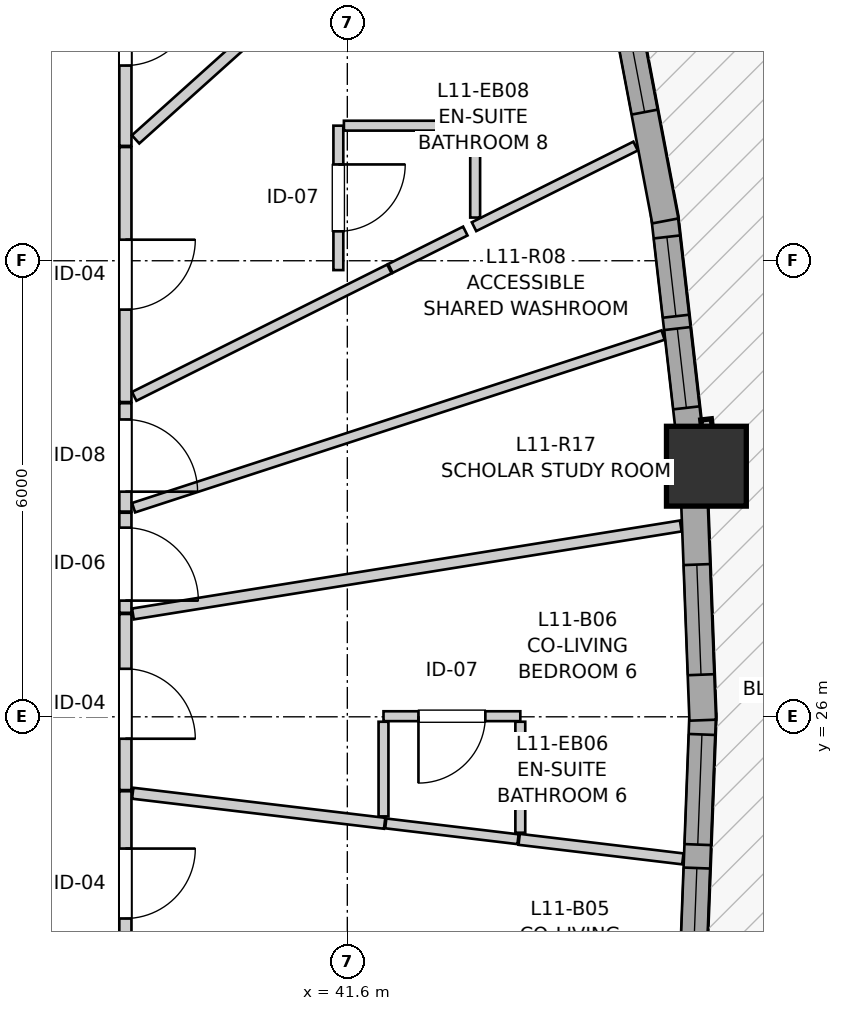
"""IFC4 building model, lengths in metres.
Left out: names, types, materials, properties, quantities, classifications, styles, units other than length and angle.
Written with IfcOpenShell. Run it as: python <this file> out.ifc"""

import sys

from ifc_helpers import new_model, si_unit, direction, frame, frame_2d, origin, origin_2d, place, context, subcontext, project, spatial, rectangle, extrude, source, transform, mapped, element, fill, save


model = new_model("IFC4")
c1 = context("Model", 3, precision=1e-05, world=origin(), true_north=direction((0.0, 1.0)))
c2 = subcontext(c1, "Body", "Model", "MODEL_VIEW")
j1 = project(units=[si_unit("LENGTHUNIT", "METRE"), si_unit("PLANEANGLEUNIT", "RADIAN")], contexts=[c1])
p1 = place(None, origin())
s1 = spatial("IfcSite", under=j1, at=p1, CompositionType="ELEMENT")
p2 = place(p1, origin())
s2 = spatial("IfcBuilding", under=s1, at=p2, CompositionType="ELEMENT")
p3 = place(p2, frame((0.0, 0.0, 39.8)))
s3 = spatial("IfcBuildingStorey", under=s2, at=p3, CompositionType="ELEMENT", Elevation=39.8)
m1 = source(origin(), c2, "Body", "SweptSolid", [
    extrude(rectangle(XDim=1.05, YDim=1.05, at=origin_2d()), origin(), (0.0, 0.0, 1.0), 2.94),
])
p4 = place(p3, frame((46.324, 29.297, 0.0), z_axis=(0.0, 0.0, 1.0), x_axis=(1.0, 0.0, 0.0)))
e1 = element("IfcColumn", 1, at=p4, inside=s3, PredefinedType="COLUMN", context=c2, shape_type="MappedRepresentation", body=[
    mapped(m1, transform((0.0, 0.0, 0.0), x_axis=(1.0, 0.0, 0.0), y_axis=(0.0, 1.0, 0.0), z_axis=(0.0, 0.0, 1.0), scale=1.0)),
])
p5 = place(p3, frame((46.15, 22.729, 0.0), z_axis=(0.0, 0.0, 1.0), x_axis=(0.03797244671, 0.999278786571, 0.0)))
e2 = element("IfcWall", 2, at=p5, inside=s3, PredefinedType="SOLIDWALL", context=c2, shape_type="SweptSolid", body=[
    extrude(rectangle(XDim=3.318, YDim=0.35, at=frame_2d((1.659, 0.0))), origin(), (0.0, 0.0, 1.0), 2.42),
])
p6 = place(p5, frame((0.332, 0.0, 0.82)))
e3 = element("IfcOpeningElement", 3, at=p6, cuts=e2, PredefinedType="OPENING", context=c2, shape_type="SweptSolid", body=[
    extrude(rectangle(XDim=0.95, YDim=1.35, at=frame_2d((0.475, 0.675))), frame((0.0, 0.185, 0.0), z_axis=(0.0, -1.0, 0.0), x_axis=(1.0, 0.0, 0.0)), (0.0, 0.0, 1.0), 0.37),
])
p7 = place(p5, frame((1.59, 0.0, 0.82)))
e4 = element("IfcOpeningElement", 4, at=p7, cuts=e2, PredefinedType="OPENING", context=c2, shape_type="SweptSolid", body=[
    extrude(rectangle(XDim=1.45, YDim=1.25, at=frame_2d((0.725, 0.625))), frame((0.0, 0.185, 0.0), z_axis=(0.0, -1.0, 0.0), x_axis=(1.0, 0.0, 0.0)), (0.0, 0.0, 1.0), 0.37),
])
p8 = place(p3, frame((46.276, 25.955, 0.0), z_axis=(0.0, 0.0, 1.0), x_axis=(-0.037939203929, 0.999280049238, 0.0)))
e5 = element("IfcWall", 5, at=p8, inside=s3, PredefinedType="SOLIDWALL", context=c2, shape_type="SweptSolid", body=[
    extrude(rectangle(XDim=3.037, YDim=0.35, at=frame_2d((1.519, 0.0))), origin(), (0.0, 0.0, 1.0), 2.42),
])
p9 = place(p8, frame((0.599, 0.0, 0.82)))
e6 = element("IfcOpeningElement", 6, at=p9, cuts=e5, PredefinedType="OPENING", context=c2, shape_type="SweptSolid", body=[
    extrude(rectangle(XDim=1.45, YDim=1.25, at=frame_2d((0.725, 0.625))), frame((0.0, 0.185, 0.0), z_axis=(0.0, -1.0, 0.0), x_axis=(1.0, 0.0, 0.0)), (0.0, 0.0, 1.0), 0.37),
])
p10 = place(p3, frame((46.116, 29.575, 0.0), z_axis=(0.0, 0.0, 1.0), x_axis=(-0.113271733229, 0.993564046477, 0.0)))
e7 = element("IfcWall", 7, at=p10, inside=s3, PredefinedType="SOLIDWALL", context=c2, shape_type="SweptSolid", body=[
    extrude(rectangle(XDim=3.056, YDim=0.35, at=frame_2d((1.528, 0.0))), origin(), (0.0, 0.0, 1.0), 2.42),
])
p11 = place(p10, frame((0.492, 0.0, 0.82)))
e8 = element("IfcOpeningElement", 8, at=p11, cuts=e7, PredefinedType="OPENING", context=c2, shape_type="SweptSolid", body=[
    extrude(rectangle(XDim=1.05, YDim=1.45, at=frame_2d((0.525, 0.725))), frame((0.0, 0.185, 0.0), z_axis=(0.0, -1.0, 0.0), x_axis=(1.0, 0.0, 0.0)), (0.0, 0.0, 1.0), 0.37),
])
p12 = place(p10, frame((1.706, 0.0, 0.82)))
e9 = element("IfcOpeningElement", 9, at=p12, cuts=e7, PredefinedType="OPENING", context=c2, shape_type="SweptSolid", body=[
    extrude(rectangle(XDim=1.05, YDim=1.45, at=frame_2d((0.525, 0.725))), frame((0.0, 0.185, 0.0), z_axis=(0.0, -1.0, 0.0), x_axis=(1.0, 0.0, 0.0)), (0.0, 0.0, 1.0), 0.37),
])
p13 = place(p3, frame((45.784, 32.524, 0.0), z_axis=(0.0, 0.0, 1.0), x_axis=(-0.186686485801, 0.982419541754, 0.0)))
e10 = element("IfcWall", 10, at=p13, inside=s3, PredefinedType="SOLIDWALL", context=c2, shape_type="SweptSolid", body=[
    extrude(rectangle(XDim=3.374, YDim=0.35, at=frame_2d((1.687, 0.0))), origin(), (0.0, 0.0, 1.0), 2.42),
])
p14 = place(p13, frame((1.457, 0.0, 0.82)))
e11 = element("IfcOpeningElement", 11, at=p14, cuts=e10, PredefinedType="OPENING", context=c2, shape_type="SweptSolid", body=[
    extrude(rectangle(XDim=1.45, YDim=1.25, at=frame_2d((0.725, 0.625))), frame((0.0, 0.185, 0.0), z_axis=(0.0, -1.0, 0.0), x_axis=(1.0, 0.0, 0.0)), (0.0, 0.0, 1.0), 0.37),
])
p15 = place(p3, frame((38.68, 33.496, 0.0), z_axis=(0.0, 0.0, 1.0), x_axis=(0.0, -1.0, 0.0)))
e12 = element("IfcWall", 12, at=p15, inside=s3, PredefinedType="PARTITIONING", context=c2, shape_type="SweptSolid", body=[
    extrude(rectangle(XDim=3.355, YDim=0.16, at=frame_2d((1.677, 0.0))), origin(), (0.0, 0.0, 1.0), 2.94),
])
p16 = place(p15, frame((1.219, 0.0, 0.0)))
e13 = element("IfcOpeningElement", 13, at=p16, cuts=e12, PredefinedType="OPENING", context=c2, shape_type="SweptSolid", body=[
    extrude(rectangle(XDim=0.92, YDim=2.1, at=frame_2d((0.46, 1.05))), frame((0.0, 0.09, 0.0), z_axis=(0.0, -1.0, 0.0), x_axis=(1.0, 0.0, 0.0)), (0.0, 0.0, 1.0), 0.18),
])
p17 = place(p3, frame((38.68, 36.58, 0.0), z_axis=(0.0, 0.0, 1.0), x_axis=(0.0, -1.0, 0.0)))
e14 = element("IfcWall", 14, at=p17, inside=s3, PredefinedType="PARTITIONING", context=c2, shape_type="SweptSolid", body=[
    extrude(rectangle(XDim=3.069, YDim=0.16, at=frame_2d((1.535, 0.0))), origin(), (0.0, 0.0, 1.0), 2.94),
])
p18 = place(p17, frame((1.092, 0.0, 0.0)))
e15 = element("IfcOpeningElement", 15, at=p18, cuts=e14, PredefinedType="OPENING", context=c2, shape_type="SweptSolid", body=[
    extrude(rectangle(XDim=0.92, YDim=2.1, at=frame_2d((0.46, 1.05))), frame((0.0, 0.09, 0.0), z_axis=(0.0, -1.0, 0.0), x_axis=(1.0, 0.0, 0.0)), (0.0, 0.0, 1.0), 0.18),
])
p19 = place(p3, frame((38.68, 25.021, 0.0), z_axis=(0.0, 0.0, 1.0), x_axis=(0.0, -1.0, 0.0)))
e16 = element("IfcWall", 16, at=p19, inside=s3, PredefinedType="PARTITIONING", context=c2, shape_type="SweptSolid", body=[
    extrude(rectangle(XDim=2.383, YDim=0.16, at=frame_2d((1.191, 0.0))), origin(), (0.0, 0.0, 1.0), 2.94),
])
p20 = place(p19, frame((0.754, 0.0, 0.0)))
e17 = element("IfcOpeningElement", 17, at=p20, cuts=e16, PredefinedType="OPENING", context=c2, shape_type="SweptSolid", body=[
    extrude(rectangle(XDim=0.92, YDim=2.1, at=frame_2d((0.46, 1.05))), frame((0.0, 0.09, 0.0), z_axis=(0.0, -1.0, 0.0), x_axis=(1.0, 0.0, 0.0)), (0.0, 0.0, 1.0), 0.18),
])
p21 = place(p3, frame((38.68, 27.353, 0.0), z_axis=(0.0, 0.0, 1.0), x_axis=(0.0, -1.0, 0.0)))
e18 = element("IfcWall", 18, at=p21, inside=s3, PredefinedType="PARTITIONING", context=c2, shape_type="SweptSolid", body=[
    extrude(rectangle(XDim=2.317, YDim=0.16, at=frame_2d((1.159, 0.0))), origin(), (0.0, 0.0, 1.0), 2.94),
])
p22 = place(p21, frame((0.721, 0.0, 0.0)))
e19 = element("IfcOpeningElement", 19, at=p22, cuts=e18, PredefinedType="OPENING", context=c2, shape_type="SweptSolid", body=[
    extrude(rectangle(XDim=0.92, YDim=2.1, at=frame_2d((0.46, 1.05))), frame((0.0, 0.09, 0.0), z_axis=(0.0, -1.0, 0.0), x_axis=(1.0, 0.0, 0.0)), (0.0, 0.0, 1.0), 0.18),
])
p23 = place(p3, frame((41.482, 33.777, 0.0), z_axis=(0.0, 0.0, 1.0), x_axis=(0.0, -1.0, 0.0)))
e20 = element("IfcWall", 20, at=p23, inside=s3, PredefinedType="PARTITIONING", context=c2, shape_type="SweptSolid", body=[
    extrude(rectangle(XDim=1.9, YDim=0.13, at=frame_2d((0.95, 0.0))), origin(), (0.0, 0.0, 1.0), 2.94),
])
p24 = place(p23, frame((0.51, 0.0, 0.0)))
e21 = element("IfcOpeningElement", 21, at=p24, cuts=e20, PredefinedType="OPENING", context=c2, shape_type="SweptSolid", body=[
    extrude(rectangle(XDim=0.88, YDim=2.05, at=frame_2d((0.44, 1.025))), frame((0.0, 0.075, 0.0), z_axis=(0.0, -1.0, 0.0), x_axis=(1.0, 0.0, 0.0)), (0.0, 0.0, 1.0), 0.15),
])
p25 = place(p3, frame((43.876, 26.008, 0.0), z_axis=(0.0, 0.0, 1.0), x_axis=(-1.0, 0.0, 0.0)))
e22 = element("IfcWall", 22, at=p25, inside=s3, PredefinedType="PARTITIONING", context=c2, shape_type="SweptSolid", body=[
    extrude(rectangle(XDim=1.8, YDim=0.13, at=frame_2d((0.9, 0.0))), origin(), (0.0, 0.0, 1.0), 2.94),
])
p26 = place(p25, frame((0.46, 0.0, 0.0)))
e23 = element("IfcOpeningElement", 23, at=p26, cuts=e22, PredefinedType="OPENING", context=c2, shape_type="SweptSolid", body=[
    extrude(rectangle(XDim=0.88, YDim=2.05, at=frame_2d((0.44, 1.025))), frame((0.0, 0.075, 0.0), z_axis=(0.0, -1.0, 0.0), x_axis=(1.0, 0.0, 0.0)), (0.0, 0.0, 1.0), 0.15),
])
p27 = place(p3, frame((38.68, 30.126, 0.0), z_axis=(0.0, 0.0, 1.0), x_axis=(0.0, -1.0, 0.0)))
e24 = element("IfcWall", 24, at=p27, inside=s3, PredefinedType="PARTITIONING", context=c2, shape_type="SweptSolid", body=[
    extrude(rectangle(XDim=1.426, YDim=0.16, at=frame_2d((0.713, 0.0))), origin(), (0.0, 0.0, 1.0), 2.94),
])
p28 = place(p27, frame((0.214, 0.0, 0.0)))
e25 = element("IfcOpeningElement", 25, at=p28, cuts=e24, PredefinedType="OPENING", context=c2, shape_type="SweptSolid", body=[
    extrude(rectangle(XDim=0.95, YDim=2.1, at=frame_2d((0.475, 1.05))), frame((0.0, 0.09, 0.0), z_axis=(0.0, -1.0, 0.0), x_axis=(1.0, 0.0, 0.0)), (0.0, 0.0, 1.0), 0.18),
])
p29 = place(p3, frame((38.68, 28.685, 0.0), z_axis=(0.0, 0.0, 1.0), x_axis=(0.0, -1.0, 0.0)))
e26 = element("IfcWall", 26, at=p29, inside=s3, PredefinedType="PARTITIONING", context=c2, shape_type="SweptSolid", body=[
    extrude(rectangle(XDim=1.317, YDim=0.16, at=frame_2d((0.659, 0.0))), origin(), (0.0, 0.0, 1.0), 2.94),
])
p30 = place(p29, frame((0.196, 0.0, 0.0)))
e27 = element("IfcOpeningElement", 27, at=p30, cuts=e26, PredefinedType="OPENING", context=c2, shape_type="SweptSolid", body=[
    extrude(rectangle(XDim=0.96, YDim=2.1, at=frame_2d((0.48, 1.05))), frame((0.0, 0.09, 0.0), z_axis=(0.0, -1.0, 0.0), x_axis=(1.0, 0.0, 0.0)), (0.0, 0.0, 1.0), 0.18),
])
p31 = place(p3, frame((38.788, 28.751, 0.0), z_axis=(0.0, 0.0, 1.0), x_axis=(0.95075822996, 0.309933522169, 0.0)))
e28 = element("IfcWall", 28, at=p31, inside=s3, PredefinedType="PARTITIONING", context=c2, shape_type="SweptSolid", body=[
    extrude(rectangle(XDim=7.327, YDim=0.13, at=frame_2d((3.664, 0.0))), origin(), (0.0, 0.0, 1.0), 2.94),
])
p32 = place(p3, frame((38.779, 27.353, 0.0), z_axis=(0.0, 0.0, 1.0), x_axis=(0.987345710334, 0.158582622897, 0.0)))
e29 = element("IfcWall", 29, at=p32, inside=s3, PredefinedType="PARTITIONING", context=c2, shape_type="SweptSolid", body=[
    extrude(rectangle(XDim=7.3, YDim=0.145, at=frame_2d((3.65, 0.0))), origin(), (0.0, 0.0, 1.0), 2.94),
])
p33 = place(p3, frame((38.814, 33.597, 0.0), z_axis=(0.0, 0.0, 1.0), x_axis=(0.74417856937, 0.667980730927, 0.0)))
e30 = element("IfcWall", 30, at=p33, inside=s3, PredefinedType="PARTITIONING", context=c2, shape_type="SweptSolid", body=[
    extrude(rectangle(XDim=4.005, YDim=0.145, at=frame_2d((2.002, 0.0))), origin(), (0.0, 0.0, 1.0), 2.94),
])
p34 = place(p3, frame((38.796, 30.216, 0.0), z_axis=(0.0, 0.0, 1.0), x_axis=(0.894739227469, 0.446588977503, 0.0)))
e31 = element("IfcWall", 31, at=p34, inside=s3, PredefinedType="PARTITIONING", context=c2, shape_type="SweptSolid", body=[
    extrude(rectangle(XDim=3.753, YDim=0.13, at=frame_2d((1.876, 0.0))), origin(), (0.0, 0.0, 1.0), 2.94),
])
p35 = place(p3, frame((38.777, 24.994, 0.0), z_axis=(0.0, 0.0, 1.0), x_axis=(0.992964132073, -0.1184155075, 0.0)))
e32 = element("IfcWall", 32, at=p35, inside=s3, PredefinedType="PARTITIONING", context=c2, shape_type="SweptSolid", body=[
    extrude(rectangle(XDim=3.338, YDim=0.145, at=frame_2d((1.669, 0.0))), origin(), (0.0, 0.0, 1.0), 2.94),
])
p36 = place(p3, frame((43.267, 32.448, 0.0), z_axis=(0.0, 0.0, 1.0), x_axis=(0.894755827923, 0.446555717014, 0.0)))
e33 = element("IfcWall", 33, at=p36, inside=s3, PredefinedType="PARTITIONING", context=c2, shape_type="SweptSolid", body=[
    extrude(rectangle(XDim=2.375, YDim=0.13, at=frame_2d((1.188, 0.0))), origin(), (0.0, 0.0, 1.0), 2.94),
])
p37 = place(p3, frame((43.861, 24.388, 0.0), z_axis=(0.0, 0.0, 1.0), x_axis=(0.992948573357, -0.118545901105, 0.0)))
e34 = element("IfcWall", 34, at=p37, inside=s3, PredefinedType="PARTITIONING", context=c2, shape_type="SweptSolid", body=[
    extrude(rectangle(XDim=2.169, YDim=0.145, at=frame_2d((1.084, 0.0))), origin(), (0.0, 0.0, 1.0), 2.94),
])
p38 = place(p3, frame((41.555, 33.777, 0.0), z_axis=(0.0, 0.0, 1.0), x_axis=(1.0, 0.0, 0.0)))
e35 = element("IfcWall", 35, at=p38, inside=s3, PredefinedType="PARTITIONING", context=c2, shape_type="SweptSolid", body=[
    extrude(rectangle(XDim=1.727, YDim=0.13, at=frame_2d((0.864, 0.0))), origin(), (0.0, 0.0, 1.0), 2.94),
])
p39 = place(p3, frame((42.106, 24.598, 0.0), z_axis=(0.0, 0.0, 1.0), x_axis=(0.992915674768, -0.118821137848, 0.0)))
e36 = element("IfcWall", 36, at=p39, inside=s3, PredefinedType="PARTITIONING", context=c2, shape_type="SweptSolid", body=[
    extrude(rectangle(XDim=1.753, YDim=0.13, at=frame_2d((0.876, 0.0))), origin(), (0.0, 0.0, 1.0), 2.94),
])
p40 = place(p3, frame((43.876, 24.475, 0.0), z_axis=(0.0, 0.0, 1.0), x_axis=(0.0, 1.0, 0.0)))
e37 = element("IfcWall", 37, at=p40, inside=s3, PredefinedType="PARTITIONING", context=c2, shape_type="SweptSolid", body=[
    extrude(rectangle(XDim=1.46, YDim=0.13, at=frame_2d((0.73, 0.0))), origin(), (0.0, 0.0, 1.0), 2.94),
])
p41 = place(p3, frame((42.076, 24.69, 0.0), z_axis=(0.0, 0.0, 1.0), x_axis=(0.0, 1.0, 0.0)))
e38 = element("IfcWall", 38, at=p41, inside=s3, PredefinedType="PARTITIONING", context=c2, shape_type="SweptSolid", body=[
    extrude(rectangle(XDim=1.245, YDim=0.13, at=frame_2d((0.623, 0.0))), origin(), (0.0, 0.0, 1.0), 2.94),
])
p42 = place(p3, frame((43.282, 32.568, 0.0), z_axis=(0.0, 0.0, 1.0), x_axis=(0.0, 1.0, 0.0)))
e39 = element("IfcWall", 39, at=p42, inside=s3, PredefinedType="PARTITIONING", context=c2, shape_type="SweptSolid", body=[
    extrude(rectangle(XDim=1.136, YDim=0.13, at=frame_2d((0.568, 0.0))), origin(), (0.0, 0.0, 1.0), 2.94),
])
p43 = place(p3, frame((42.167, 31.899, 0.0), z_axis=(0.0, 0.0, 1.0), x_axis=(0.894604533516, 0.446858734515, 0.0)))
e40 = element("IfcWall", 40, at=p43, inside=s3, PredefinedType="PARTITIONING", context=c2, shape_type="SweptSolid", body=[
    extrude(rectangle(XDim=1.101, YDim=0.13, at=frame_2d((0.55, 0.0))), origin(), (0.0, 0.0, 1.0), 2.94),
])
m2 = source(origin(), c2, "Body", "SweptSolid", [
    extrude(rectangle(XDim=0.95, YDim=1.35, at=frame_2d((0.475, 0.675))), frame((0.0, 0.03, 0.0), z_axis=(0.0, -1.0, 0.0), x_axis=(1.0, 0.0, 0.0)), (0.0, 0.0, 1.0), 0.06),
])
p44 = place(p6, origin())
e41 = element("IfcWindow", 41, at=p44, inside=s3, PartitioningType="SINGLE_PANEL", PredefinedType="WINDOW", context=c2, shape_type="MappedRepresentation", body=[
    mapped(m2, transform((0.0, 0.0, 0.0), x_axis=(1.0, 0.0, 0.0), y_axis=(0.0, 1.0, 0.0), z_axis=(0.0, 0.0, 1.0), scale=1.0)),
])
fill(e3, e41)
m3 = source(origin(), c2, "Body", "SweptSolid", [
    extrude(rectangle(XDim=1.45, YDim=1.25, at=frame_2d((0.725, 0.625))), frame((0.0, 0.03, 0.0), z_axis=(0.0, -1.0, 0.0), x_axis=(1.0, 0.0, 0.0)), (0.0, 0.0, 1.0), 0.06),
])
p45 = place(p7, origin())
e42 = element("IfcWindow", 42, at=p45, inside=s3, PartitioningType="SINGLE_PANEL", PredefinedType="WINDOW", context=c2, shape_type="MappedRepresentation", body=[
    mapped(m3, transform((0.0, 0.0, 0.0), x_axis=(1.0, 0.0, 0.0), y_axis=(0.0, 1.0, 0.0), z_axis=(0.0, 0.0, 1.0), scale=1.0)),
])
fill(e4, e42)
p46 = place(p9, origin())
e43 = element("IfcWindow", 43, at=p46, inside=s3, PartitioningType="SINGLE_PANEL", PredefinedType="WINDOW", context=c2, shape_type="MappedRepresentation", body=[
    mapped(m3, transform((0.0, 0.0, 0.0), x_axis=(1.0, 0.0, 0.0), y_axis=(0.0, 1.0, 0.0), z_axis=(0.0, 0.0, 1.0), scale=1.0)),
])
fill(e6, e43)
m4 = source(origin(), c2, "Body", "SweptSolid", [
    extrude(rectangle(XDim=1.05, YDim=1.45, at=frame_2d((0.525, 0.725))), frame((0.0, 0.03, 0.0), z_axis=(0.0, -1.0, 0.0), x_axis=(1.0, 0.0, 0.0)), (0.0, 0.0, 1.0), 0.06),
])
p47 = place(p11, origin())
e44 = element("IfcWindow", 44, at=p47, inside=s3, PartitioningType="SINGLE_PANEL", PredefinedType="WINDOW", context=c2, shape_type="MappedRepresentation", body=[
    mapped(m4, transform((0.0, 0.0, 0.0), x_axis=(1.0, 0.0, 0.0), y_axis=(0.0, 1.0, 0.0), z_axis=(0.0, 0.0, 1.0), scale=1.0)),
])
fill(e8, e44)
p48 = place(p12, origin())
e45 = element("IfcWindow", 45, at=p48, inside=s3, PartitioningType="SINGLE_PANEL", PredefinedType="WINDOW", context=c2, shape_type="MappedRepresentation", body=[
    mapped(m4, transform((0.0, 0.0, 0.0), x_axis=(1.0, 0.0, 0.0), y_axis=(0.0, 1.0, 0.0), z_axis=(0.0, 0.0, 1.0), scale=1.0)),
])
fill(e9, e45)
p49 = place(p14, origin())
e46 = element("IfcWindow", 46, at=p49, inside=s3, PartitioningType="SINGLE_PANEL", PredefinedType="WINDOW", context=c2, shape_type="MappedRepresentation", body=[
    mapped(m3, transform((0.0, 0.0, 0.0), x_axis=(1.0, 0.0, 0.0), y_axis=(0.0, 1.0, 0.0), z_axis=(0.0, 0.0, 1.0), scale=1.0)),
])
fill(e11, e46)
m5 = source(origin(), c2, "Body", "SweptSolid", [
    extrude(rectangle(XDim=0.92, YDim=2.1, at=frame_2d((0.46, 1.05))), frame((0.0, 0.025, 0.0), z_axis=(0.0, -1.0, 0.0), x_axis=(1.0, 0.0, 0.0)), (0.0, 0.0, 1.0), 0.05),
])
p50 = place(p16, origin())
e47 = element("IfcDoor", 47, at=p50, inside=s3, OperationType="SINGLE_SWING_LEFT", PredefinedType="DOOR", context=c2, shape_type="MappedRepresentation", body=[
    mapped(m5, transform((0.0, 0.0, 0.0), x_axis=(1.0, 0.0, 0.0), y_axis=(0.0, 1.0, 0.0), z_axis=(0.0, 0.0, 1.0), scale=1.0)),
])
fill(e13, e47)
p51 = place(p18, origin())
e48 = element("IfcDoor", 48, at=p51, inside=s3, OperationType="SINGLE_SWING_LEFT", PredefinedType="DOOR", context=c2, shape_type="MappedRepresentation", body=[
    mapped(m5, transform((0.0, 0.0, 0.0), x_axis=(1.0, 0.0, 0.0), y_axis=(0.0, 1.0, 0.0), z_axis=(0.0, 0.0, 1.0), scale=1.0)),
])
fill(e15, e48)
p52 = place(p20, origin())
e49 = element("IfcDoor", 49, at=p52, inside=s3, OperationType="SINGLE_SWING_LEFT", PredefinedType="DOOR", context=c2, shape_type="MappedRepresentation", body=[
    mapped(m5, transform((0.0, 0.0, 0.0), x_axis=(1.0, 0.0, 0.0), y_axis=(0.0, 1.0, 0.0), z_axis=(0.0, 0.0, 1.0), scale=1.0)),
])
fill(e17, e49)
p53 = place(p22, origin())
e50 = element("IfcDoor", 50, at=p53, inside=s3, OperationType="SINGLE_SWING_RIGHT", PredefinedType="DOOR", context=c2, shape_type="MappedRepresentation", body=[
    mapped(m5, transform((0.0, 0.0, 0.0), x_axis=(1.0, 0.0, 0.0), y_axis=(0.0, 1.0, 0.0), z_axis=(0.0, 0.0, 1.0), scale=1.0)),
])
fill(e19, e50)
m6 = source(origin(), c2, "Body", "SweptSolid", [
    extrude(rectangle(XDim=0.88, YDim=2.05, at=frame_2d((0.44, 1.025))), frame((0.0, 0.025, 0.0), z_axis=(0.0, -1.0, 0.0), x_axis=(1.0, 0.0, 0.0)), (0.0, 0.0, 1.0), 0.05),
])
p54 = place(p24, origin())
e51 = element("IfcDoor", 51, at=p54, inside=s3, OperationType="SINGLE_SWING_LEFT", PredefinedType="DOOR", context=c2, shape_type="MappedRepresentation", body=[
    mapped(m6, transform((0.0, 0.0, 0.0), x_axis=(1.0, 0.0, 0.0), y_axis=(0.0, 1.0, 0.0), z_axis=(0.0, 0.0, 1.0), scale=1.0)),
])
fill(e21, e51)
p55 = place(p26, origin())
e52 = element("IfcDoor", 52, at=p55, inside=s3, OperationType="SINGLE_SWING_RIGHT", PredefinedType="DOOR", context=c2, shape_type="MappedRepresentation", body=[
    mapped(m6, transform((0.0, 0.0, 0.0), x_axis=(1.0, 0.0, 0.0), y_axis=(0.0, 1.0, 0.0), z_axis=(0.0, 0.0, 1.0), scale=1.0)),
])
fill(e23, e52)
m7 = source(origin(), c2, "Body", "SweptSolid", [
    extrude(rectangle(XDim=0.95, YDim=2.1, at=frame_2d((0.475, 1.05))), frame((0.0, 0.025, 0.0), z_axis=(0.0, -1.0, 0.0), x_axis=(1.0, 0.0, 0.0)), (0.0, 0.0, 1.0), 0.05),
])
p56 = place(p28, origin())
e53 = element("IfcDoor", 53, at=p56, inside=s3, OperationType="SINGLE_SWING_RIGHT", PredefinedType="DOOR", context=c2, shape_type="MappedRepresentation", body=[
    mapped(m7, transform((0.0, 0.0, 0.0), x_axis=(1.0, 0.0, 0.0), y_axis=(0.0, 1.0, 0.0), z_axis=(0.0, 0.0, 1.0), scale=1.0)),
])
fill(e25, e53)
m8 = source(origin(), c2, "Body", "SweptSolid", [
    extrude(rectangle(XDim=0.96, YDim=2.1, at=frame_2d((0.48, 1.05))), frame((0.0, 0.025, 0.0), z_axis=(0.0, -1.0, 0.0), x_axis=(1.0, 0.0, 0.0)), (0.0, 0.0, 1.0), 0.05),
])
p57 = place(p30, origin())
e54 = element("IfcDoor", 54, at=p57, inside=s3, OperationType="SINGLE_SWING_RIGHT", PredefinedType="DOOR", context=c2, shape_type="MappedRepresentation", body=[
    mapped(m8, transform((0.0, 0.0, 0.0), x_axis=(1.0, 0.0, 0.0), y_axis=(0.0, 1.0, 0.0), z_axis=(0.0, 0.0, 1.0), scale=1.0)),
])
fill(e27, e54)
save(model, sys.argv[1])
